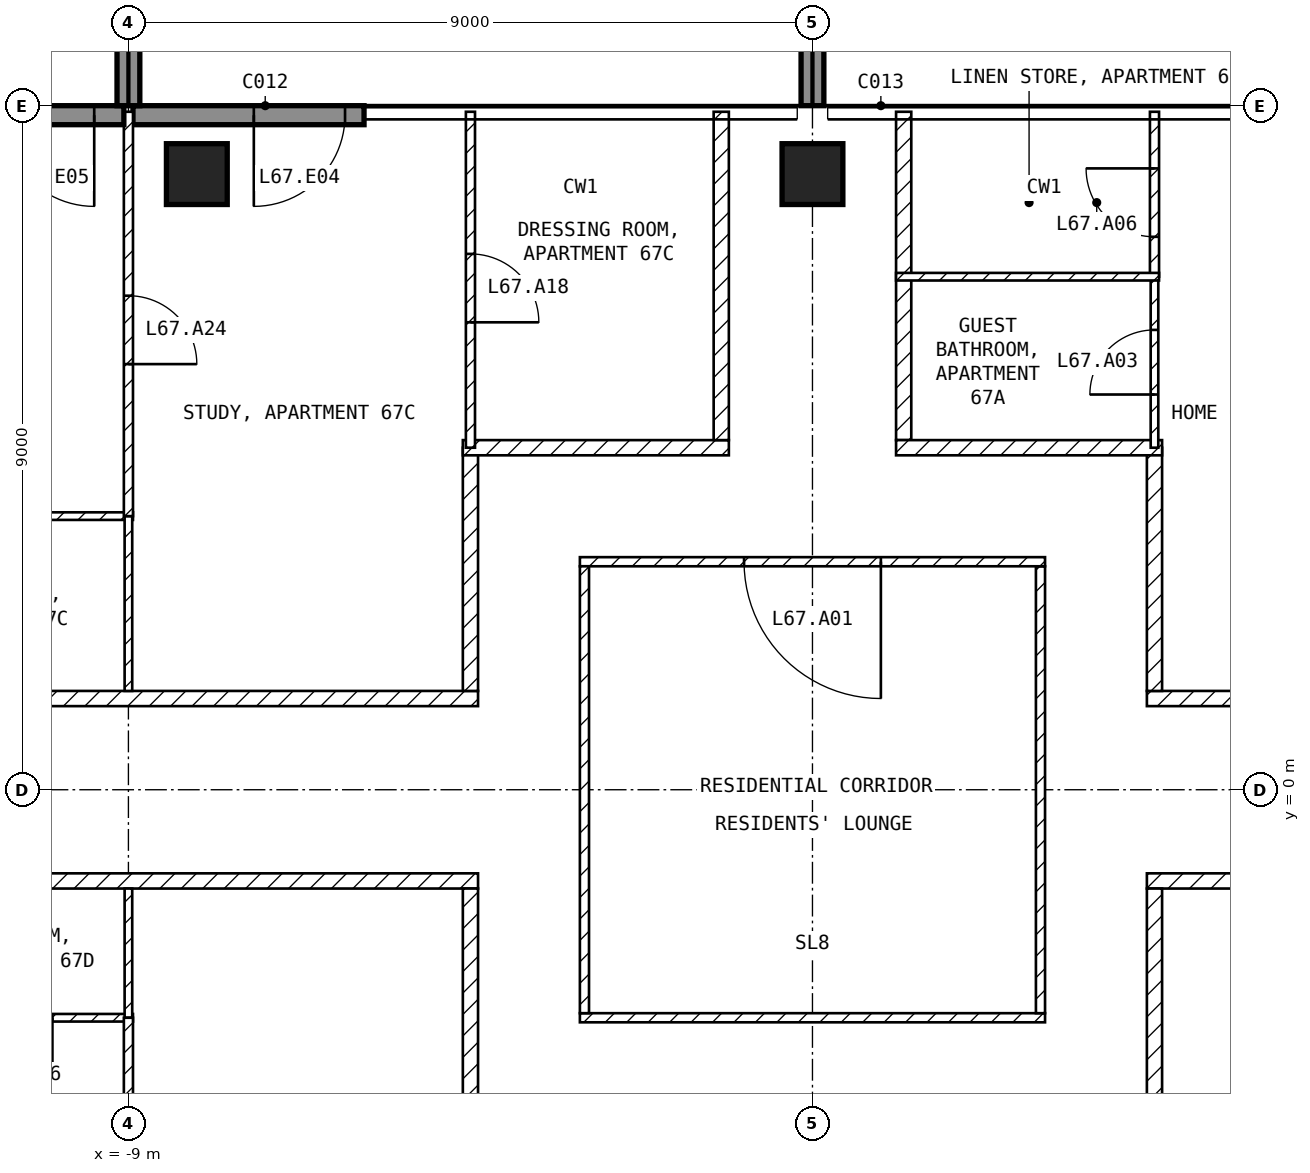
"""IFC4 building model, lengths in metres.
Left out: names, types, materials, properties, quantities, classifications, styles, units other than length and angle.
Written with IfcOpenShell. Run it as: python <this file> out.ifc"""

import sys

from ifc_helpers import new_model, si_unit, direction, frame, frame_2d, origin, origin_2d, place, context, subcontext, project, spatial, rectangle, extrude, element, fill, save


model = new_model("IFC4")
c1 = context("Model", 3, precision=1e-05, world=origin(), true_north=direction((0.0, 1.0)))
c2 = subcontext(c1, "Body", "Model", "MODEL_VIEW")
j1 = project(units=[si_unit("LENGTHUNIT", "METRE"), si_unit("PLANEANGLEUNIT", "RADIAN")], contexts=[c1])
p1 = place(None, origin())
s1 = spatial("IfcSite", under=j1, at=p1, CompositionType="ELEMENT")
p2 = place(p1, origin())
s2 = spatial("IfcBuilding", under=s1, at=p2, CompositionType="ELEMENT")
p3 = place(p2, frame((0.0, 0.0, 264.0)))
s3 = spatial("IfcBuildingStorey", under=s2, at=p3, CompositionType="ELEMENT", Elevation=264.0)
for number, where, z_axis, x_axis in (
    (1, (-8.1, 8.1, -0.25), (0.0, 0.0, 1.0), (1.0, 0.0, 0.0)),
    (2, (0.0, 8.1, -0.25), (0.0, 0.0, 1.0), (1.0, 0.0, 0.0)),
):
    element("IfcColumn", number, at=place(p3, frame(where, z_axis=z_axis, x_axis=x_axis)), inside=s3, PredefinedType="COLUMN", context=c2, shape_type="SweptSolid", body=[
        extrude(rectangle(XDim=0.8, YDim=0.8, at=origin_2d()), origin(), (0.0, 0.0, 1.0), 3.5),
    ])
p4 = place(p3, frame((-5.9, 8.875, 0.0), z_axis=(0.0, 0.0, 1.0), x_axis=(-1.0, 0.0, 0.0)))
e3 = element("IfcWall", 3, at=p4, inside=s3, PredefinedType="SOLIDWALL", context=c2, shape_type="SweptSolid", body=[
    extrude(rectangle(XDim=3.04, YDim=0.25, at=frame_2d((1.52, 0.0))), origin(), (0.0, 0.0, 1.0), 3.25),
])
p5 = place(p4, frame((0.25, 0.0, 0.0)))
e4 = element("IfcOpeningElement", 4, at=p5, cuts=e3, PredefinedType="OPENING", context=c2, shape_type="SweptSolid", body=[
    extrude(rectangle(XDim=1.2, YDim=2.4, at=frame_2d((0.6, 1.2))), frame((0.0, 0.135, 0.0), z_axis=(0.0, -1.0, 0.0), x_axis=(1.0, 0.0, 0.0)), (0.0, 0.0, 1.0), 0.27),
])
p6 = place(p3, frame((-9.06, 8.875, 0.0), z_axis=(0.0, 0.0, 1.0), x_axis=(-1.0, 0.0, 0.0)))
e5 = element("IfcWall", 5, at=p6, inside=s3, PredefinedType="SOLIDWALL", context=c2, shape_type="SweptSolid", body=[
    extrude(rectangle(XDim=1.84, YDim=0.25, at=frame_2d((0.92, 0.0))), origin(), (0.0, 0.0, 1.0), 3.25),
])
p7 = place(p6, frame((0.39, 0.0, 0.0)))
e6 = element("IfcOpeningElement", 6, at=p7, cuts=e5, PredefinedType="OPENING", context=c2, shape_type="SweptSolid", body=[
    extrude(rectangle(XDim=1.2, YDim=2.4, at=frame_2d((0.6, 1.2))), frame((0.0, 0.135, 0.0), z_axis=(0.0, -1.0, 0.0), x_axis=(1.0, 0.0, 0.0)), (0.0, 0.0, 1.0), 0.27),
])
for number, where, z_axis, x_axis in (
    (7, (-9.0, 9.0, 0.0), (0.0, 0.0, 1.0), (0.0, 1.0, 0.0)),
    (8, (0.0, 9.0, 0.0), (0.0, 0.0, 1.0), (0.0, 1.0, 0.0)),
):
    element("IfcWall", number, at=place(p3, frame(where, z_axis=z_axis, x_axis=x_axis)), inside=s3, PredefinedType="SOLIDWALL", context=c2, shape_type="SweptSolid", body=[
        extrude(rectangle(XDim=2.7, YDim=0.3, at=frame_2d((1.35, 0.0))), origin(), (0.0, 0.0, 1.0), 3.25),
    ])
p8 = place(p3, frame((-3.06, -3.0, 0.0), z_axis=(0.0, 0.0, 1.0), x_axis=(1.0, 0.0, 0.0)))
e9 = element("IfcWall", 9, at=p8, inside=s3, PredefinedType="PARTITIONING", context=c2, shape_type="SweptSolid", body=[
    extrude(rectangle(XDim=6.12, YDim=0.12, at=frame_2d((3.06, 0.0))), origin(), (0.0, 0.0, 1.0), 3.25),
])
p9 = place(p3, frame((3.0, -2.94, 0.0), z_axis=(0.0, 0.0, 1.0), x_axis=(0.0, 1.0, 0.0)))
e10 = element("IfcWall", 10, at=p9, inside=s3, PredefinedType="PARTITIONING", context=c2, shape_type="SweptSolid", body=[
    extrude(rectangle(XDim=5.88, YDim=0.12, at=frame_2d((2.94, 0.0))), origin(), (0.0, 0.0, 1.0), 3.25),
])
p10 = place(p3, frame((3.06, 3.0, 0.0), z_axis=(0.0, 0.0, 1.0), x_axis=(-1.0, 0.0, 0.0)))
e11 = element("IfcWall", 11, at=p10, inside=s3, PredefinedType="PARTITIONING", context=c2, shape_type="SweptSolid", body=[
    extrude(rectangle(XDim=6.12, YDim=0.12, at=frame_2d((3.06, 0.0))), origin(), (0.0, 0.0, 1.0), 3.25),
])
p11 = place(p10, frame((2.16, 0.0, 0.0)))
e12 = element("IfcOpeningElement", 12, at=p11, cuts=e11, PredefinedType="OPENING", context=c2, shape_type="SweptSolid", body=[
    extrude(rectangle(XDim=1.8, YDim=2.1, at=frame_2d((0.9, 1.05))), frame((0.0, 0.07, 0.0), z_axis=(0.0, -1.0, 0.0), x_axis=(1.0, 0.0, 0.0)), (0.0, 0.0, 1.0), 0.14),
])
p12 = place(p3, frame((-3.0, 2.94, 0.0), z_axis=(0.0, 0.0, 1.0), x_axis=(0.0, -1.0, 0.0)))
e13 = element("IfcWall", 13, at=p12, inside=s3, PredefinedType="PARTITIONING", context=c2, shape_type="SweptSolid", body=[
    extrude(rectangle(XDim=5.88, YDim=0.12, at=frame_2d((2.94, 0.0))), origin(), (0.0, 0.0, 1.0), 3.25),
])
p13 = place(p3, frame((4.4, 1.2, 0.0), z_axis=(0.0, 0.0, 1.0), x_axis=(1.0, 0.0, 0.0)))
e14 = element("IfcWall", 14, at=p13, inside=s3, PredefinedType="PARTITIONING", context=c2, shape_type="SweptSolid", body=[
    extrude(rectangle(XDim=17.2, YDim=0.2, at=frame_2d((8.6, 0.0))), origin(), (0.0, 0.0, 1.0), 3.25),
])
p14 = place(p13, frame((13.175, 0.0, 0.0)))
e15 = element("IfcOpeningElement", 15, at=p14, cuts=e14, PredefinedType="OPENING", context=c2, shape_type="SweptSolid", body=[
    extrude(rectangle(XDim=1.0, YDim=2.1, at=frame_2d((0.5, 1.05))), frame((0.0, 0.11, 0.0), z_axis=(0.0, -1.0, 0.0), x_axis=(1.0, 0.0, 0.0)), (0.0, 0.0, 1.0), 0.22),
])
p15 = place(p3, frame((4.5, 4.5, 0.0), z_axis=(0.0, 0.0, 1.0), x_axis=(0.0, -1.0, 0.0)))
e16 = element("IfcWall", 16, at=p15, inside=s3, PredefinedType="PARTITIONING", context=c2, shape_type="SweptSolid", body=[
    extrude(rectangle(XDim=3.2, YDim=0.2, at=frame_2d((1.6, 0.0))), origin(), (0.0, 0.0, 1.0), 3.25),
])
p16 = place(p3, frame((1.2, 8.92, 0.0), z_axis=(0.0, 0.0, 1.0), x_axis=(0.0, -1.0, 0.0)))
e17 = element("IfcWall", 17, at=p16, inside=s3, PredefinedType="PARTITIONING", context=c2, shape_type="SweptSolid", body=[
    extrude(rectangle(XDim=4.32, YDim=0.2, at=frame_2d((2.16, 0.0))), origin(), (0.0, 0.0, 1.0), 3.25),
])
p17 = place(p3, frame((1.1, 4.5, 0.0), z_axis=(0.0, 0.0, 1.0), x_axis=(1.0, 0.0, 0.0)))
e18 = element("IfcWall", 18, at=p17, inside=s3, PredefinedType="PARTITIONING", context=c2, shape_type="SweptSolid", body=[
    extrude(rectangle(XDim=3.5, YDim=0.2, at=frame_2d((1.75, 0.0))), origin(), (0.0, 0.0, 1.0), 3.25),
])
p18 = place(p3, frame((21.6, -1.2, 0.0), z_axis=(0.0, 0.0, 1.0), x_axis=(-1.0, 0.0, 0.0)))
e19 = element("IfcWall", 19, at=p18, inside=s3, PredefinedType="PARTITIONING", context=c2, shape_type="SweptSolid", body=[
    extrude(rectangle(XDim=17.2, YDim=0.2, at=frame_2d((8.6, 0.0))), origin(), (0.0, 0.0, 1.0), 3.25),
])
p19 = place(p18, frame((10.45, 0.0, 0.0)))
e20 = element("IfcOpeningElement", 20, at=p19, cuts=e19, PredefinedType="OPENING", context=c2, shape_type="SweptSolid", body=[
    extrude(rectangle(XDim=1.0, YDim=2.1, at=frame_2d((0.5, 1.05))), frame((0.0, 0.11, 0.0), z_axis=(0.0, -1.0, 0.0), x_axis=(1.0, 0.0, 0.0)), (0.0, 0.0, 1.0), 0.22),
])
p20 = place(p3, frame((4.5, -1.3, 0.0), z_axis=(0.0, 0.0, 1.0), x_axis=(0.0, -1.0, 0.0)))
e21 = element("IfcWall", 21, at=p20, inside=s3, PredefinedType="PARTITIONING", context=c2, shape_type="SweptSolid", body=[
    extrude(rectangle(XDim=3.2, YDim=0.2, at=frame_2d((1.6, 0.0))), origin(), (0.0, 0.0, 1.0), 3.25),
])
p21 = place(p3, frame((-21.6, 1.2, 0.0), z_axis=(0.0, 0.0, 1.0), x_axis=(1.0, 0.0, 0.0)))
e22 = element("IfcWall", 22, at=p21, inside=s3, PredefinedType="PARTITIONING", context=c2, shape_type="SweptSolid", body=[
    extrude(rectangle(XDim=17.2, YDim=0.2, at=frame_2d((8.6, 0.0))), origin(), (0.0, 0.0, 1.0), 3.25),
])
p22 = place(p21, frame((3.85, 0.0, 0.0)))
e23 = element("IfcOpeningElement", 23, at=p22, cuts=e22, PredefinedType="OPENING", context=c2, shape_type="SweptSolid", body=[
    extrude(rectangle(XDim=1.0, YDim=2.1, at=frame_2d((0.5, 1.05))), frame((0.0, 0.11, 0.0), z_axis=(0.0, -1.0, 0.0), x_axis=(1.0, 0.0, 0.0)), (0.0, 0.0, 1.0), 0.22),
])
p23 = place(p3, frame((-4.5, 1.3, 0.0), z_axis=(0.0, 0.0, 1.0), x_axis=(0.0, 1.0, 0.0)))
e24 = element("IfcWall", 24, at=p23, inside=s3, PredefinedType="PARTITIONING", context=c2, shape_type="SweptSolid", body=[
    extrude(rectangle(XDim=3.2, YDim=0.2, at=frame_2d((1.6, 0.0))), origin(), (0.0, 0.0, 1.0), 3.25),
])
p24 = place(p3, frame((-4.6, 4.5, 0.0), z_axis=(0.0, 0.0, 1.0), x_axis=(1.0, 0.0, 0.0)))
e25 = element("IfcWall", 25, at=p24, inside=s3, PredefinedType="PARTITIONING", context=c2, shape_type="SweptSolid", body=[
    extrude(rectangle(XDim=3.5, YDim=0.2, at=frame_2d((1.75, 0.0))), origin(), (0.0, 0.0, 1.0), 3.25),
])
p25 = place(p3, frame((-1.2, 4.6, 0.0), z_axis=(0.0, 0.0, 1.0), x_axis=(0.0, 1.0, 0.0)))
e26 = element("IfcWall", 26, at=p25, inside=s3, PredefinedType="PARTITIONING", context=c2, shape_type="SweptSolid", body=[
    extrude(rectangle(XDim=4.32, YDim=0.2, at=frame_2d((2.16, 0.0))), origin(), (0.0, 0.0, 1.0), 3.25),
])
p26 = place(p3, frame((-4.4, -1.2, 0.0), z_axis=(0.0, 0.0, 1.0), x_axis=(-1.0, 0.0, 0.0)))
e27 = element("IfcWall", 27, at=p26, inside=s3, PredefinedType="PARTITIONING", context=c2, shape_type="SweptSolid", body=[
    extrude(rectangle(XDim=17.2, YDim=0.2, at=frame_2d((8.6, 0.0))), origin(), (0.0, 0.0, 1.0), 3.25),
])
p27 = place(p26, frame((11.6, 0.0, 0.0)))
e28 = element("IfcOpeningElement", 28, at=p27, cuts=e27, PredefinedType="OPENING", context=c2, shape_type="SweptSolid", body=[
    extrude(rectangle(XDim=1.0, YDim=2.1, at=frame_2d((0.5, 1.05))), frame((0.0, 0.11, 0.0), z_axis=(0.0, -1.0, 0.0), x_axis=(1.0, 0.0, 0.0)), (0.0, 0.0, 1.0), 0.22),
])
p28 = place(p3, frame((-4.5, -4.5, 0.0), z_axis=(0.0, 0.0, 1.0), x_axis=(0.0, 1.0, 0.0)))
e29 = element("IfcWall", 29, at=p28, inside=s3, PredefinedType="PARTITIONING", context=c2, shape_type="SweptSolid", body=[
    extrude(rectangle(XDim=3.2, YDim=0.2, at=frame_2d((1.6, 0.0))), origin(), (0.0, 0.0, 1.0), 3.25),
])
p29 = place(p3, frame((4.5, 4.5, 0.0), z_axis=(0.0, 0.0, 1.0), x_axis=(0.0, 1.0, 0.0)))
e30 = element("IfcWall", 30, at=p29, inside=s3, PredefinedType="PARTITIONING", context=c2, shape_type="SweptSolid", body=[
    extrude(rectangle(XDim=2.25, YDim=0.1, at=frame_2d((1.125, 0.0))), origin(), (0.0, 0.0, 1.0), 3.25),
])
p30 = place(p29, frame((0.7, 0.0, 0.0)))
e31 = element("IfcOpeningElement", 31, at=p30, cuts=e30, PredefinedType="OPENING", context=c2, shape_type="SweptSolid", body=[
    extrude(rectangle(XDim=0.85, YDim=2.1, at=frame_2d((0.425, 1.05))), frame((0.0, 0.06, 0.0), z_axis=(0.0, -1.0, 0.0), x_axis=(1.0, 0.0, 0.0)), (0.0, 0.0, 1.0), 0.12),
])
p31 = place(p3, frame((4.5, 6.75, 0.0), z_axis=(0.0, 0.0, 1.0), x_axis=(0.0, 1.0, 0.0)))
e32 = element("IfcWall", 32, at=p31, inside=s3, PredefinedType="PARTITIONING", context=c2, shape_type="SweptSolid", body=[
    extrude(rectangle(XDim=2.17, YDim=0.12, at=frame_2d((1.085, 0.0))), origin(), (0.0, 0.0, 1.0), 3.25),
])
p32 = place(p31, frame((0.525, 0.0, 0.0)))
e33 = element("IfcOpeningElement", 33, at=p32, cuts=e32, PredefinedType="OPENING", context=c2, shape_type="SweptSolid", body=[
    extrude(rectangle(XDim=0.9, YDim=2.1, at=frame_2d((0.45, 1.05))), frame((0.0, 0.07, 0.0), z_axis=(0.0, -1.0, 0.0), x_axis=(1.0, 0.0, 0.0)), (0.0, 0.0, 1.0), 0.14),
])
p33 = place(p3, frame((1.1, 6.75, 0.0), z_axis=(0.0, 0.0, 1.0), x_axis=(1.0, 0.0, 0.0)))
e34 = element("IfcWall", 34, at=p33, inside=s3, PredefinedType="PARTITIONING", context=c2, shape_type="SweptSolid", body=[
    extrude(rectangle(XDim=3.46, YDim=0.1, at=frame_2d((1.73, 0.0))), origin(), (0.0, 0.0, 1.0), 3.25),
])
p34 = place(p3, frame((-12.6, 3.6, 0.0), z_axis=(0.0, 0.0, 1.0), x_axis=(1.0, 0.0, 0.0)))
e35 = element("IfcWall", 35, at=p34, inside=s3, PredefinedType="PARTITIONING", context=c2, shape_type="SweptSolid", body=[
    extrude(rectangle(XDim=3.66, YDim=0.1, at=frame_2d((1.83, 0.0))), origin(), (0.0, 0.0, 1.0), 3.25),
])
p35 = place(p34, frame((1.375, 0.0, 0.0)))
e36 = element("IfcOpeningElement", 36, at=p35, cuts=e35, PredefinedType="OPENING", context=c2, shape_type="SweptSolid", body=[
    extrude(rectangle(XDim=0.85, YDim=2.1, at=frame_2d((0.425, 1.05))), frame((0.0, 0.06, 0.0), z_axis=(0.0, -1.0, 0.0), x_axis=(1.0, 0.0, 0.0)), (0.0, 0.0, 1.0), 0.12),
])
p36 = place(p3, frame((-9.0, 3.6, 0.0), z_axis=(0.0, 0.0, 1.0), x_axis=(0.0, -1.0, 0.0)))
e37 = element("IfcWall", 37, at=p36, inside=s3, PredefinedType="PARTITIONING", context=c2, shape_type="SweptSolid", body=[
    extrude(rectangle(XDim=2.3, YDim=0.1, at=frame_2d((1.15, 0.0))), origin(), (0.0, 0.0, 1.0), 3.25),
])
p37 = place(p3, frame((-9.0, 8.92, 0.0), z_axis=(0.0, 0.0, 1.0), x_axis=(0.0, -1.0, 0.0)))
e38 = element("IfcWall", 38, at=p37, inside=s3, PredefinedType="PARTITIONING", context=c2, shape_type="SweptSolid", body=[
    extrude(rectangle(XDim=5.32, YDim=0.12, at=frame_2d((2.66, 0.0))), origin(), (0.0, 0.0, 1.0), 3.25),
])
p38 = place(p37, frame((2.42, 0.0, 0.0)))
e39 = element("IfcOpeningElement", 39, at=p38, cuts=e38, PredefinedType="OPENING", context=c2, shape_type="SweptSolid", body=[
    extrude(rectangle(XDim=0.9, YDim=2.1, at=frame_2d((0.45, 1.05))), frame((0.0, 0.07, 0.0), z_axis=(0.0, -1.0, 0.0), x_axis=(1.0, 0.0, 0.0)), (0.0, 0.0, 1.0), 0.14),
])
p39 = place(p3, frame((-4.5, 8.92, 0.0), z_axis=(0.0, 0.0, 1.0), x_axis=(0.0, -1.0, 0.0)))
e40 = element("IfcWall", 40, at=p39, inside=s3, PredefinedType="PARTITIONING", context=c2, shape_type="SweptSolid", body=[
    extrude(rectangle(XDim=4.42, YDim=0.12, at=frame_2d((2.21, 0.0))), origin(), (0.0, 0.0, 1.0), 3.25),
])
p40 = place(p39, frame((1.87, 0.0, 0.0)))
e41 = element("IfcOpeningElement", 41, at=p40, cuts=e40, PredefinedType="OPENING", context=c2, shape_type="SweptSolid", body=[
    extrude(rectangle(XDim=0.9, YDim=2.1, at=frame_2d((0.45, 1.05))), frame((0.0, 0.07, 0.0), z_axis=(0.0, -1.0, 0.0), x_axis=(1.0, 0.0, 0.0)), (0.0, 0.0, 1.0), 0.14),
])
p41 = place(p3, frame((-8.94, -3.0, 0.0), z_axis=(0.0, 0.0, 1.0), x_axis=(-1.0, 0.0, 0.0)))
e42 = element("IfcWall", 42, at=p41, inside=s3, PredefinedType="PARTITIONING", context=c2, shape_type="SweptSolid", body=[
    extrude(rectangle(XDim=2.91, YDim=0.1, at=frame_2d((1.455, 0.0))), origin(), (0.0, 0.0, 1.0), 3.25),
])
p42 = place(p41, frame((1.06, 0.0, 0.0)))
e43 = element("IfcOpeningElement", 43, at=p42, cuts=e42, PredefinedType="OPENING", context=c2, shape_type="SweptSolid", body=[
    extrude(rectangle(XDim=0.85, YDim=2.1, at=frame_2d((0.425, 1.05))), frame((0.0, 0.06, 0.0), z_axis=(0.0, -1.0, 0.0), x_axis=(1.0, 0.0, 0.0)), (0.0, 0.0, 1.0), 0.12),
])
p43 = place(p3, frame((-9.0, -1.3, 0.0), z_axis=(0.0, 0.0, 1.0), x_axis=(0.0, -1.0, 0.0)))
e44 = element("IfcWall", 44, at=p43, inside=s3, PredefinedType="PARTITIONING", context=c2, shape_type="SweptSolid", body=[
    extrude(rectangle(XDim=1.7, YDim=0.1, at=frame_2d((0.85, 0.0))), origin(), (0.0, 0.0, 1.0), 3.25),
])
p44 = place(p3, frame((-9.0, -3.0, 0.0), z_axis=(0.0, 0.0, 1.0), x_axis=(0.0, -1.0, 0.0)))
e45 = element("IfcWall", 45, at=p44, inside=s3, PredefinedType="PARTITIONING", context=c2, shape_type="SweptSolid", body=[
    extrude(rectangle(XDim=5.92, YDim=0.12, at=frame_2d((2.96, 0.0))), origin(), (0.0, 0.0, 1.0), 3.25),
])
p45 = place(p44, frame((2.4, 0.0, 0.0)))
e46 = element("IfcOpeningElement", 46, at=p45, cuts=e45, PredefinedType="OPENING", context=c2, shape_type="SweptSolid", body=[
    extrude(rectangle(XDim=0.9, YDim=2.1, at=frame_2d((0.45, 1.05))), frame((0.0, 0.07, 0.0), z_axis=(0.0, -1.0, 0.0), x_axis=(1.0, 0.0, 0.0)), (0.0, 0.0, 1.0), 0.14),
])
p46 = place(p5, origin())
e47 = element("IfcDoor", 47, at=p46, inside=s3, OperationType="SINGLE_SWING_RIGHT", PredefinedType="DOOR", context=c2, shape_type="SweptSolid", body=[
    extrude(rectangle(XDim=1.2, YDim=2.4, at=frame_2d((0.6, 1.2))), frame((0.0, 0.025, 0.0), z_axis=(0.0, -1.0, 0.0), x_axis=(1.0, 0.0, 0.0)), (0.0, 0.0, 1.0), 0.05),
])
fill(e4, e47)
p47 = place(p7, origin())
e48 = element("IfcDoor", 48, at=p47, inside=s3, OperationType="SINGLE_SWING_LEFT", PredefinedType="DOOR", context=c2, shape_type="SweptSolid", body=[
    extrude(rectangle(XDim=1.2, YDim=2.4, at=frame_2d((0.6, 1.2))), frame((0.0, 0.025, 0.0), z_axis=(0.0, -1.0, 0.0), x_axis=(1.0, 0.0, 0.0)), (0.0, 0.0, 1.0), 0.05),
])
fill(e6, e48)
p48 = place(p11, origin())
e49 = element("IfcDoor", 49, at=p48, inside=s3, OperationType="SINGLE_SWING_LEFT", PredefinedType="DOOR", context=c2, shape_type="SweptSolid", body=[
    extrude(rectangle(XDim=1.8, YDim=2.1, at=frame_2d((0.9, 1.05))), frame((0.0, 0.025, 0.0), z_axis=(0.0, -1.0, 0.0), x_axis=(1.0, 0.0, 0.0)), (0.0, 0.0, 1.0), 0.05),
])
fill(e12, e49)
p49 = place(p30, origin())
e50 = element("IfcDoor", 50, at=p49, inside=s3, OperationType="SINGLE_SWING_LEFT", PredefinedType="DOOR", context=c2, shape_type="SweptSolid", body=[
    extrude(rectangle(XDim=0.85, YDim=2.1, at=frame_2d((0.425, 1.05))), frame((0.0, 0.025, 0.0), z_axis=(0.0, -1.0, 0.0), x_axis=(1.0, 0.0, 0.0)), (0.0, 0.0, 1.0), 0.05),
])
fill(e31, e50)
p50 = place(p32, origin())
e51 = element("IfcDoor", 51, at=p50, inside=s3, OperationType="SINGLE_SWING_RIGHT", PredefinedType="DOOR", context=c2, shape_type="SweptSolid", body=[
    extrude(rectangle(XDim=0.9, YDim=2.1, at=frame_2d((0.45, 1.05))), frame((0.0, 0.025, 0.0), z_axis=(0.0, -1.0, 0.0), x_axis=(1.0, 0.0, 0.0)), (0.0, 0.0, 1.0), 0.05),
])
fill(e33, e51)
p51 = place(p40, origin())
e52 = element("IfcDoor", 52, at=p51, inside=s3, OperationType="SINGLE_SWING_RIGHT", PredefinedType="DOOR", context=c2, shape_type="SweptSolid", body=[
    extrude(rectangle(XDim=0.9, YDim=2.1, at=frame_2d((0.45, 1.05))), frame((0.0, 0.025, 0.0), z_axis=(0.0, -1.0, 0.0), x_axis=(1.0, 0.0, 0.0)), (0.0, 0.0, 1.0), 0.05),
])
fill(e41, e52)
p52 = place(p38, origin())
e53 = element("IfcDoor", 53, at=p52, inside=s3, OperationType="SINGLE_SWING_RIGHT", PredefinedType="DOOR", context=c2, shape_type="SweptSolid", body=[
    extrude(rectangle(XDim=0.9, YDim=2.1, at=frame_2d((0.45, 1.05))), frame((0.0, 0.025, 0.0), z_axis=(0.0, -1.0, 0.0), x_axis=(1.0, 0.0, 0.0)), (0.0, 0.0, 1.0), 0.05),
])
fill(e39, e53)
save(model, sys.argv[1])
